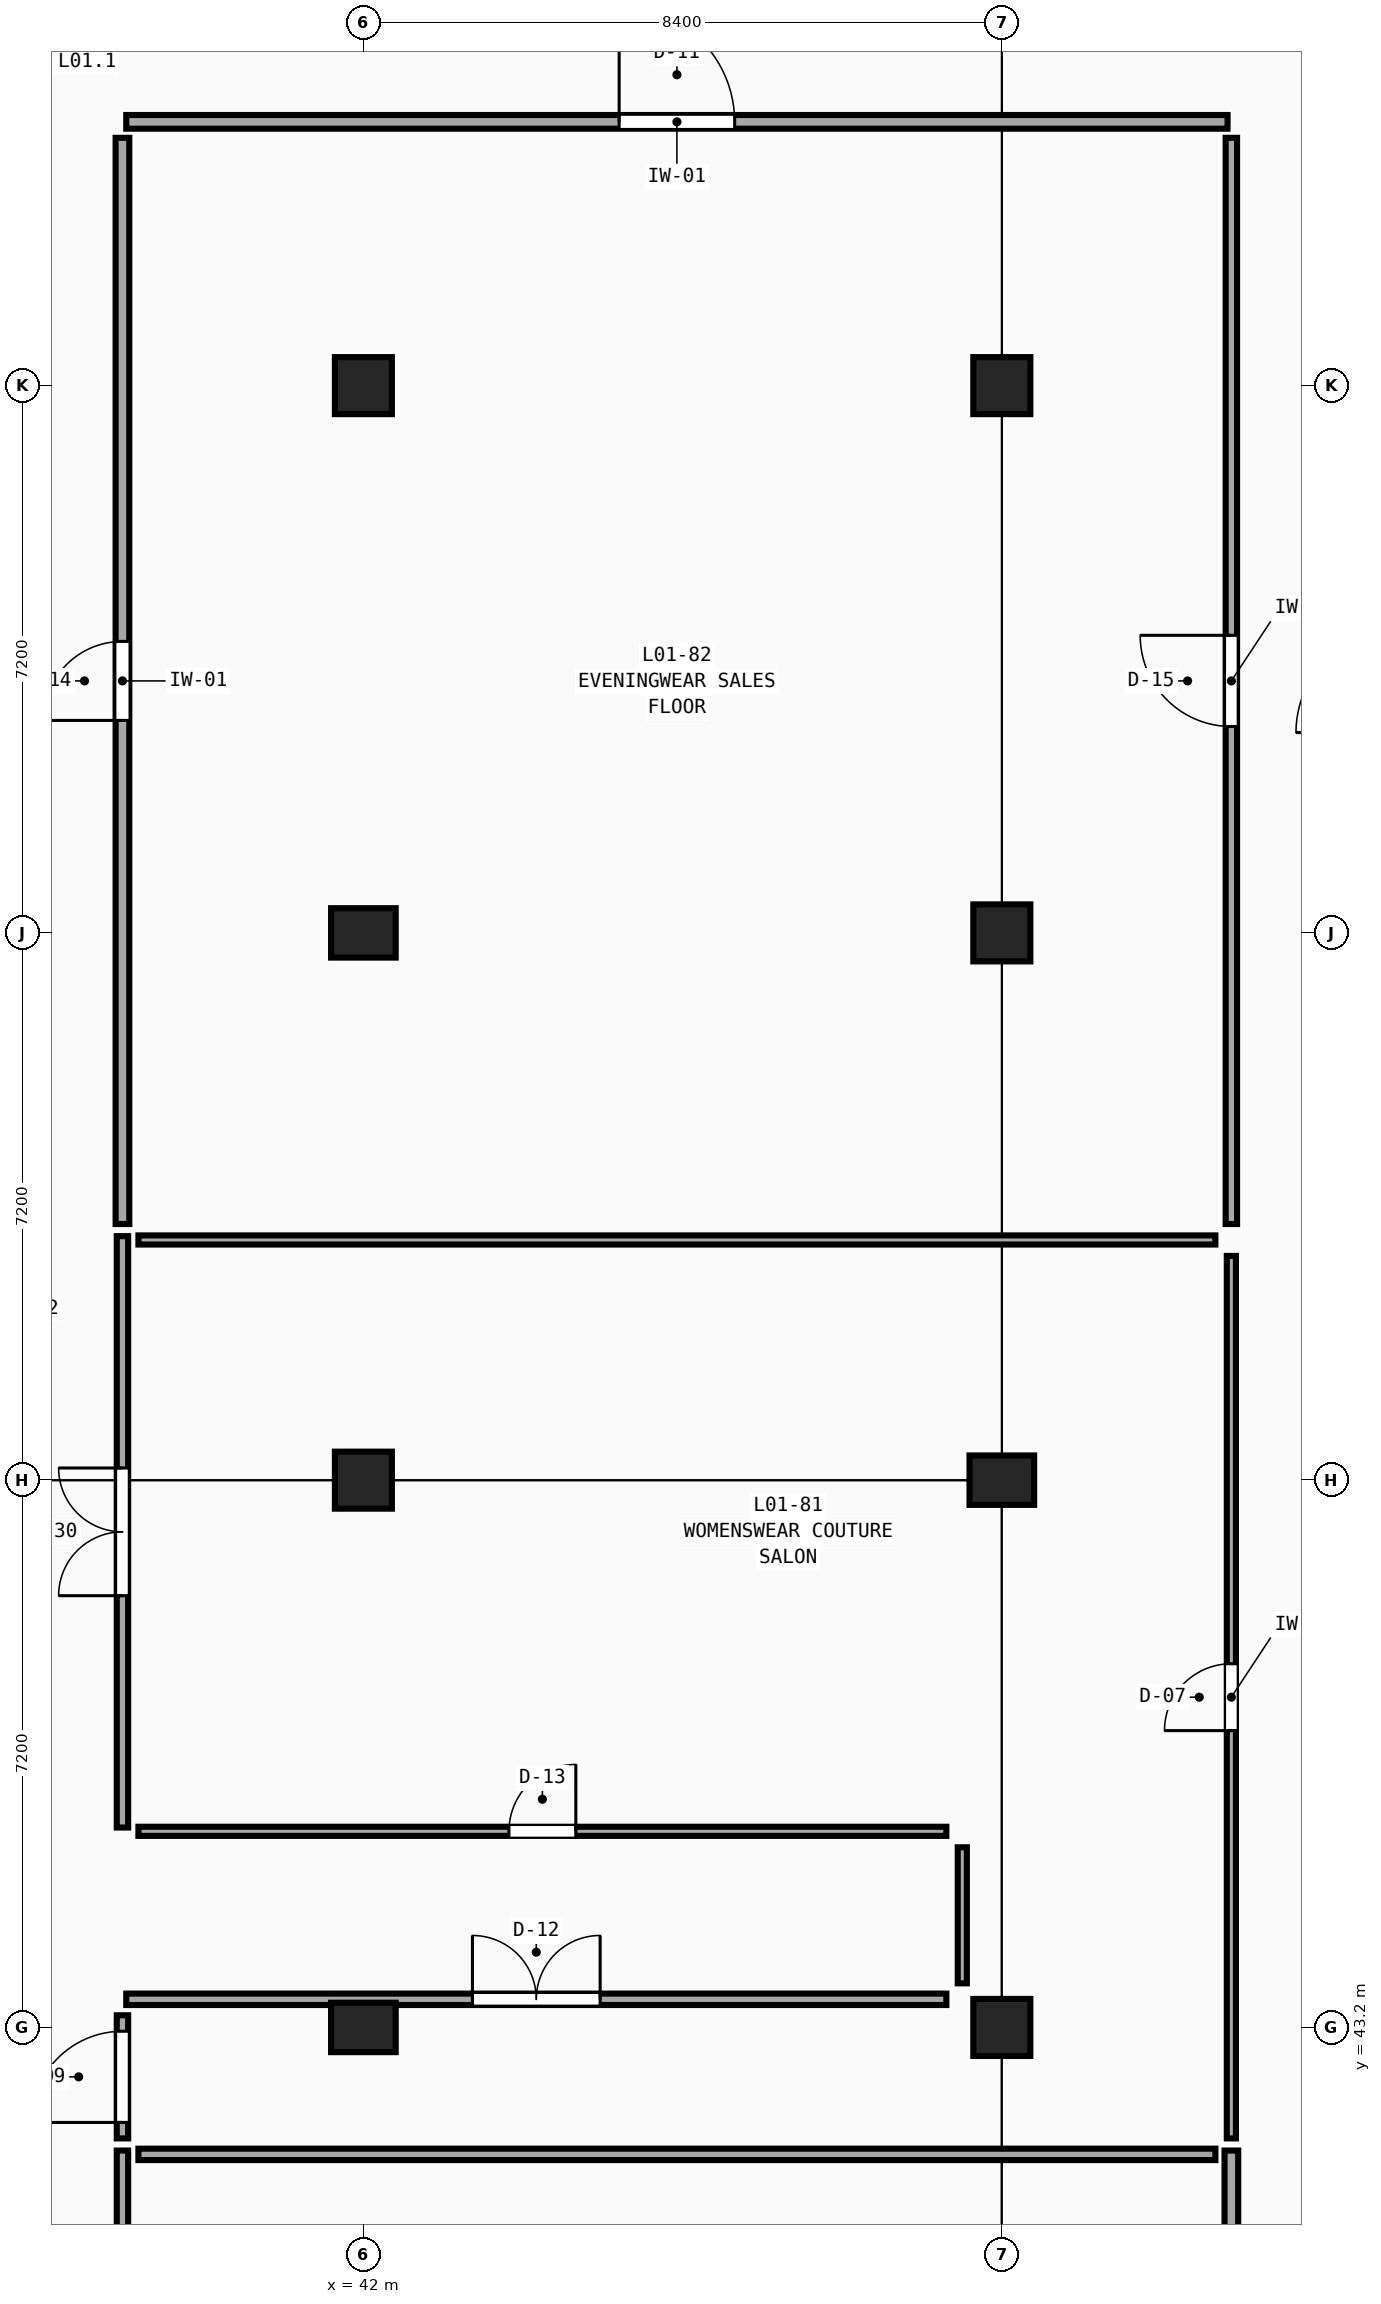
"""IFC4 building model, lengths in metres.
Left out: names, types, materials, properties, quantities, classifications, styles, units other than length and angle.
Written with IfcOpenShell. Run it as: python <this file> out.ifc"""

import sys

from ifc_helpers import new_model, si_unit, direction, frame, frame_2d, origin, origin_2d, place, context, subcontext, project, spatial, rectangle, extrude, element, fill, save


model = new_model("IFC4")
c1 = context("Model", 3, precision=1e-05, world=origin(), true_north=direction((0.0, 1.0)))
c2 = subcontext(c1, "Body", "Model", "MODEL_VIEW")
j1 = project(units=[si_unit("LENGTHUNIT", "METRE"), si_unit("PLANEANGLEUNIT", "RADIAN")], contexts=[c1])
p1 = place(None, origin())
s1 = spatial("IfcSite", under=j1, at=p1, CompositionType="ELEMENT")
p2 = place(p1, origin())
s2 = spatial("IfcBuilding", under=s1, at=p2, CompositionType="ELEMENT")
p3 = place(p2, frame((0.0, 0.0, 5.4)))
s3 = spatial("IfcBuildingStorey", under=s2, at=p3, CompositionType="ELEMENT", Elevation=5.4)
p4 = place(p3, frame((42.0, 43.2, 0.0), z_axis=(0.0, 0.0, 1.0), x_axis=(1.0, 0.0, 0.0)))
e1 = element("IfcColumn", 1, at=p4, inside=s3, PredefinedType="COLUMN", context=c2, shape_type="SweptSolid", body=[
    extrude(rectangle(XDim=0.85, YDim=0.65, at=origin_2d()), origin(), (0.0, 0.0, 1.0), 4.5),
])
p5 = place(p3, frame((42.0, 50.4, 0.0), z_axis=(0.0, 0.0, 1.0), x_axis=(1.0, 0.0, 0.0)))
e2 = element("IfcColumn", 2, at=p5, inside=s3, PredefinedType="COLUMN", context=c2, shape_type="SweptSolid", body=[
    extrude(rectangle(XDim=0.75, YDim=0.75, at=origin_2d()), origin(), (0.0, 0.0, 1.0), 4.5),
])
p6 = place(p3, frame((42.0, 57.6, 0.0), z_axis=(0.0, 0.0, 1.0), x_axis=(1.0, 0.0, 0.0)))
e3 = element("IfcColumn", 3, at=p6, inside=s3, PredefinedType="COLUMN", context=c2, shape_type="SweptSolid", body=[
    extrude(rectangle(XDim=0.85, YDim=0.65, at=origin_2d()), origin(), (0.0, 0.0, 1.0), 4.5),
])
for number, where, z_axis, x_axis in (
    (4, (42.0, 64.8, 0.0), (0.0, 0.0, 1.0), (1.0, 0.0, 0.0)),
    (5, (50.4, 43.2, 0.0), (0.0, 0.0, 1.0), (1.0, 0.0, 0.0)),
):
    element("IfcColumn", number, at=place(p3, frame(where, z_axis=z_axis, x_axis=x_axis)), inside=s3, PredefinedType="COLUMN", context=c2, shape_type="SweptSolid", body=[
        extrude(rectangle(XDim=0.75, YDim=0.75, at=origin_2d()), origin(), (0.0, 0.0, 1.0), 4.5),
    ])
p7 = place(p3, frame((50.4, 50.4, 0.0), z_axis=(0.0, 0.0, 1.0), x_axis=(1.0, 0.0, 0.0)))
e6 = element("IfcColumn", 6, at=p7, inside=s3, PredefinedType="COLUMN", context=c2, shape_type="SweptSolid", body=[
    extrude(rectangle(XDim=0.85, YDim=0.65, at=origin_2d()), origin(), (0.0, 0.0, 1.0), 4.5),
])
for number, where, z_axis, x_axis in (
    (7, (50.4, 57.6, 0.0), (0.0, 0.0, 1.0), (1.0, 0.0, 0.0)),
    (8, (50.4, 64.8, 0.0), (0.0, 0.0, 1.0), (1.0, 0.0, 0.0)),
):
    element("IfcColumn", number, at=place(p3, frame(where, z_axis=z_axis, x_axis=x_axis)), inside=s3, PredefinedType="COLUMN", context=c2, shape_type="SweptSolid", body=[
        extrude(rectangle(XDim=0.75, YDim=0.75, at=origin_2d()), origin(), (0.0, 0.0, 1.0), 4.5),
    ])
p8 = place(p3, frame((38.88, 68.27, 0.0), z_axis=(0.0, 0.0, 1.0), x_axis=(1.0, 0.0, 0.0)))
e9 = element("IfcWall", 9, at=p8, inside=s3, PredefinedType="PARTITIONING", context=c2, shape_type="SweptSolid", body=[
    extrude(rectangle(XDim=14.49, YDim=0.18, at=frame_2d((7.245, 0.0))), origin(), (0.0, 0.0, 1.0), 4.18),
])
p9 = place(p8, frame((6.485, 0.0, 0.0)))
e10 = element("IfcOpeningElement", 10, at=p9, cuts=e9, PredefinedType="OPENING", context=c2, shape_type="SweptSolid", body=[
    extrude(rectangle(XDim=1.52, YDim=2.13, at=frame_2d((0.76, 1.065))), frame((0.0, 0.11, 0.0), z_axis=(0.0, -1.0, 0.0), x_axis=(1.0, 0.0, 0.0)), (0.0, 0.0, 1.0), 0.22),
])
p10 = place(p3, frame((38.83, 53.77, 0.0), z_axis=(0.0, 0.0, 1.0), x_axis=(0.0, 1.0, 0.0)))
e11 = element("IfcWall", 11, at=p10, inside=s3, PredefinedType="PARTITIONING", context=c2, shape_type="SweptSolid", body=[
    extrude(rectangle(XDim=14.29, YDim=0.18, at=frame_2d((7.145, 0.0))), origin(), (0.0, 0.0, 1.0), 4.18),
])
p11 = place(p10, frame((6.625, 0.0, 0.0)))
e12 = element("IfcOpeningElement", 12, at=p11, cuts=e11, PredefinedType="OPENING", context=c2, shape_type="SweptSolid", body=[
    extrude(rectangle(XDim=1.04, YDim=2.21, at=frame_2d((0.52, 1.105))), frame((0.0, 0.11, 0.0), z_axis=(0.0, -1.0, 0.0), x_axis=(1.0, 0.0, 0.0)), (0.0, 0.0, 1.0), 0.22),
])
p12 = place(p3, frame((53.42, 53.77, 0.0), z_axis=(0.0, 0.0, 1.0), x_axis=(0.0, 1.0, 0.0)))
e13 = element("IfcWall", 13, at=p12, inside=s3, PredefinedType="PARTITIONING", context=c2, shape_type="SweptSolid", body=[
    extrude(rectangle(XDim=14.29, YDim=0.15, at=frame_2d((7.145, 0.0))), origin(), (0.0, 0.0, 1.0), 4.18),
])
p13 = place(p12, frame((6.545, 0.0, 0.0)))
e14 = element("IfcOpeningElement", 14, at=p13, cuts=e13, PredefinedType="OPENING", context=c2, shape_type="SweptSolid", body=[
    extrude(rectangle(XDim=1.2, YDim=2.21, at=frame_2d((0.6, 1.105))), frame((0.0, 0.095, 0.0), z_axis=(0.0, -1.0, 0.0), x_axis=(1.0, 0.0, 0.0)), (0.0, 0.0, 1.0), 0.19),
])
p14 = place(p3, frame((53.42, 27.33, 0.0), z_axis=(0.0, 0.0, 1.0), x_axis=(0.0, 1.0, 0.0)))
e15 = element("IfcWall", 15, at=p14, inside=s3, PredefinedType="PARTITIONING", context=c2, shape_type="SweptSolid", body=[
    extrude(rectangle(XDim=14.25, YDim=0.18, at=frame_2d((7.125, 0.0))), origin(), (0.0, 0.0, 1.0), 4.18),
])
p15 = place(p14, frame((6.365, 0.0, 0.0)))
e16 = element("IfcOpeningElement", 16, at=p15, cuts=e15, PredefinedType="OPENING", context=c2, shape_type="SweptSolid", body=[
    extrude(rectangle(XDim=1.52, YDim=2.21, at=frame_2d((0.76, 1.105))), frame((0.0, 0.11, 0.0), z_axis=(0.0, -1.0, 0.0), x_axis=(1.0, 0.0, 0.0)), (0.0, 0.0, 1.0), 0.22),
])
p16 = place(p3, frame((38.83, 27.33, 0.0), z_axis=(0.0, 0.0, 1.0), x_axis=(0.0, 1.0, 0.0)))
e17 = element("IfcWall", 17, at=p16, inside=s3, PredefinedType="PARTITIONING", context=c2, shape_type="SweptSolid", body=[
    extrude(rectangle(XDim=14.25, YDim=0.15, at=frame_2d((7.125, 0.0))), origin(), (0.0, 0.0, 1.0), 4.18),
])
p17 = place(p16, frame((6.285, 0.0, 0.0)))
e18 = element("IfcOpeningElement", 18, at=p17, cuts=e17, PredefinedType="OPENING", context=c2, shape_type="SweptSolid", body=[
    extrude(rectangle(XDim=1.68, YDim=2.21, at=frame_2d((0.84, 1.105))), frame((0.0, 0.095, 0.0), z_axis=(0.0, -1.0, 0.0), x_axis=(1.0, 0.0, 0.0)), (0.0, 0.0, 1.0), 0.19),
])
p18 = place(p3, frame((53.42, 41.74, 0.0), z_axis=(0.0, 0.0, 1.0), x_axis=(0.0, 1.0, 0.0)))
e19 = element("IfcWall", 19, at=p18, inside=s3, PredefinedType="PARTITIONING", context=c2, shape_type="SweptSolid", body=[
    extrude(rectangle(XDim=11.61, YDim=0.12, at=frame_2d((5.805, 0.0))), origin(), (0.0, 0.0, 1.0), 4.18),
])
p19 = place(p18, frame((5.365, 0.0, 0.0)))
e20 = element("IfcOpeningElement", 20, at=p19, cuts=e19, PredefinedType="OPENING", context=c2, shape_type="SweptSolid", body=[
    extrude(rectangle(XDim=0.88, YDim=2.13, at=frame_2d((0.44, 1.065))), frame((0.0, 0.08, 0.0), z_axis=(0.0, -1.0, 0.0), x_axis=(1.0, 0.0, 0.0)), (0.0, 0.0, 1.0), 0.16),
])
p20 = place(p3, frame((38.88, 43.57, 0.0), z_axis=(0.0, 0.0, 1.0), x_axis=(1.0, 0.0, 0.0)))
e21 = element("IfcWall", 21, at=p20, inside=s3, PredefinedType="PARTITIONING", context=c2, shape_type="SweptSolid", body=[
    extrude(rectangle(XDim=10.79, YDim=0.15, at=frame_2d((5.395, 0.0))), origin(), (0.0, 0.0, 1.0), 3.73),
])
p21 = place(p20, frame((4.555, 0.0, 0.0)))
e22 = element("IfcOpeningElement", 22, at=p21, cuts=e21, PredefinedType="OPENING", context=c2, shape_type="SweptSolid", body=[
    extrude(rectangle(XDim=1.68, YDim=2.13, at=frame_2d((0.84, 1.065))), frame((0.0, 0.095, 0.0), z_axis=(0.0, -1.0, 0.0), x_axis=(1.0, 0.0, 0.0)), (0.0, 0.0, 1.0), 0.19),
])
p22 = place(p3, frame((39.04, 45.78, 0.0), z_axis=(0.0, 0.0, 1.0), x_axis=(1.0, 0.0, 0.0)))
e23 = element("IfcWall", 23, at=p22, inside=s3, PredefinedType="PARTITIONING", context=c2, shape_type="SweptSolid", body=[
    extrude(rectangle(XDim=10.63, YDim=0.12, at=frame_2d((5.315, 0.0))), origin(), (0.0, 0.0, 1.0), 4.18),
])
p23 = place(p22, frame((4.875, 0.0, 0.0)))
e24 = element("IfcOpeningElement", 24, at=p23, cuts=e23, PredefinedType="OPENING", context=c2, shape_type="SweptSolid", body=[
    extrude(rectangle(XDim=0.88, YDim=2.21, at=frame_2d((0.44, 1.105))), frame((0.0, 0.08, 0.0), z_axis=(0.0, -1.0, 0.0), x_axis=(1.0, 0.0, 0.0)), (0.0, 0.0, 1.0), 0.16),
])
p24 = place(p3, frame((38.83, 45.83, 0.0), z_axis=(0.0, 0.0, 1.0), x_axis=(0.0, 1.0, 0.0)))
e25 = element("IfcWall", 25, at=p24, inside=s3, PredefinedType="PARTITIONING", context=c2, shape_type="SweptSolid", body=[
    extrude(rectangle(XDim=7.78, YDim=0.15, at=frame_2d((3.89, 0.0))), origin(), (0.0, 0.0, 1.0), 4.18),
])
p25 = place(p24, frame((3.05, 0.0, 0.0)))
e26 = element("IfcOpeningElement", 26, at=p25, cuts=e25, PredefinedType="OPENING", context=c2, shape_type="SweptSolid", body=[
    extrude(rectangle(XDim=1.68, YDim=2.37, at=frame_2d((0.84, 1.185))), frame((0.0, 0.095, 0.0), z_axis=(0.0, -1.0, 0.0), x_axis=(1.0, 0.0, 0.0)), (0.0, 0.0, 1.0), 0.19),
])
p26 = place(p3, frame((49.88, 43.78, 0.0), z_axis=(0.0, 0.0, 1.0), x_axis=(0.0, 1.0, 0.0)))
e27 = element("IfcWall", 27, at=p26, inside=s3, PredefinedType="PARTITIONING", context=c2, shape_type="SweptSolid", body=[
    extrude(rectangle(XDim=1.79, YDim=0.12, at=frame_2d((0.895, 0.0))), origin(), (0.0, 0.0, 1.0), 3.73),
])
p27 = place(p3, frame((38.83, 41.74, 0.0), z_axis=(0.0, 0.0, 1.0), x_axis=(0.0, 1.0, 0.0)))
e28 = element("IfcWall", 28, at=p27, inside=s3, PredefinedType="PARTITIONING", context=c2, shape_type="SweptSolid", body=[
    extrude(rectangle(XDim=1.62, YDim=0.15, at=frame_2d((0.81, 0.0))), origin(), (0.0, 0.0, 1.0), 4.18),
])
p28 = place(p27, frame((0.21, 0.0, 0.0)))
e29 = element("IfcOpeningElement", 29, at=p28, cuts=e28, PredefinedType="OPENING", context=c2, shape_type="SweptSolid", body=[
    extrude(rectangle(XDim=1.2, YDim=2.13, at=frame_2d((0.6, 1.065))), frame((0.0, 0.095, 0.0), z_axis=(0.0, -1.0, 0.0), x_axis=(1.0, 0.0, 0.0)), (0.0, 0.0, 1.0), 0.19),
])
p29 = place(p3, frame((39.04, 41.53, 0.0), z_axis=(0.0, 0.0, 1.0), x_axis=(1.0, 0.0, 0.0)))
e30 = element("IfcWall", 30, at=p29, inside=s3, PredefinedType="PARTITIONING", context=c2, shape_type="SweptSolid", body=[
    extrude(rectangle(XDim=14.17, YDim=0.15, at=frame_2d((7.085, 0.0))), origin(), (0.0, 0.0, 1.0), 4.18),
])
p30 = place(p3, frame((39.04, 53.56, 0.0), z_axis=(0.0, 0.0, 1.0), x_axis=(1.0, 0.0, 0.0)))
e31 = element("IfcWall", 31, at=p30, inside=s3, PredefinedType="PARTITIONING", context=c2, shape_type="SweptSolid", body=[
    extrude(rectangle(XDim=14.17, YDim=0.12, at=frame_2d((7.085, 0.0))), origin(), (0.0, 0.0, 1.0), 4.18),
])
p31 = place(p9, origin())
e32 = element("IfcDoor", 32, at=p31, inside=s3, OperationType="SINGLE_SWING_LEFT", PredefinedType="DOOR", context=c2, shape_type="SweptSolid", body=[
    extrude(rectangle(XDim=1.52, YDim=2.13, at=frame_2d((0.76, 1.065))), frame((0.0, 0.025, 0.0), z_axis=(0.0, -1.0, 0.0), x_axis=(1.0, 0.0, 0.0)), (0.0, 0.0, 1.0), 0.05),
])
fill(e10, e32)
p32 = place(p11, origin())
e33 = element("IfcDoor", 33, at=p32, inside=s3, OperationType="SINGLE_SWING_LEFT", PredefinedType="DOOR", context=c2, shape_type="SweptSolid", body=[
    extrude(rectangle(XDim=1.04, YDim=2.21, at=frame_2d((0.52, 1.105))), frame((0.0, 0.025, 0.0), z_axis=(0.0, -1.0, 0.0), x_axis=(1.0, 0.0, 0.0)), (0.0, 0.0, 1.0), 0.05),
])
fill(e12, e33)
p33 = place(p13, origin())
e34 = element("IfcDoor", 34, at=p33, inside=s3, OperationType="SINGLE_SWING_RIGHT", PredefinedType="DOOR", context=c2, shape_type="SweptSolid", body=[
    extrude(rectangle(XDim=1.2, YDim=2.21, at=frame_2d((0.6, 1.105))), frame((0.0, 0.025, 0.0), z_axis=(0.0, -1.0, 0.0), x_axis=(1.0, 0.0, 0.0)), (0.0, 0.0, 1.0), 0.05),
])
fill(e14, e34)
p34 = place(p19, origin())
e35 = element("IfcDoor", 35, at=p34, inside=s3, OperationType="SINGLE_SWING_LEFT", PredefinedType="DOOR", context=c2, shape_type="SweptSolid", body=[
    extrude(rectangle(XDim=0.88, YDim=2.13, at=frame_2d((0.44, 1.065))), frame((0.0, 0.025, 0.0), z_axis=(0.0, -1.0, 0.0), x_axis=(1.0, 0.0, 0.0)), (0.0, 0.0, 1.0), 0.05),
])
fill(e20, e35)
p35 = place(p21, origin())
e36 = element("IfcDoor", 36, at=p35, inside=s3, OperationType="DOUBLE_DOOR_SINGLE_SWING", PredefinedType="DOOR", context=c2, shape_type="SweptSolid", body=[
    extrude(rectangle(XDim=1.68, YDim=2.13, at=frame_2d((0.84, 1.065))), frame((0.0, 0.025, 0.0), z_axis=(0.0, -1.0, 0.0), x_axis=(1.0, 0.0, 0.0)), (0.0, 0.0, 1.0), 0.05),
])
fill(e22, e36)
p36 = place(p23, origin())
e37 = element("IfcDoor", 37, at=p36, inside=s3, OperationType="SINGLE_SWING_RIGHT", PredefinedType="DOOR", context=c2, shape_type="SweptSolid", body=[
    extrude(rectangle(XDim=0.88, YDim=2.21, at=frame_2d((0.44, 1.105))), frame((0.0, 0.025, 0.0), z_axis=(0.0, -1.0, 0.0), x_axis=(1.0, 0.0, 0.0)), (0.0, 0.0, 1.0), 0.05),
])
fill(e24, e37)
p37 = place(p25, origin())
e38 = element("IfcDoor", 38, at=p37, inside=s3, OperationType="DOUBLE_DOOR_SINGLE_SWING", PredefinedType="DOOR", context=c2, shape_type="SweptSolid", body=[
    extrude(rectangle(XDim=1.68, YDim=2.37, at=frame_2d((0.84, 1.185))), frame((0.0, 0.025, 0.0), z_axis=(0.0, -1.0, 0.0), x_axis=(1.0, 0.0, 0.0)), (0.0, 0.0, 1.0), 0.05),
])
fill(e26, e38)
p38 = place(p28, origin())
e39 = element("IfcDoor", 39, at=p38, inside=s3, OperationType="SINGLE_SWING_LEFT", PredefinedType="DOOR", context=c2, shape_type="SweptSolid", body=[
    extrude(rectangle(XDim=1.2, YDim=2.13, at=frame_2d((0.6, 1.065))), frame((0.0, 0.025, 0.0), z_axis=(0.0, -1.0, 0.0), x_axis=(1.0, 0.0, 0.0)), (0.0, 0.0, 1.0), 0.05),
])
fill(e29, e39)
save(model, sys.argv[1])
